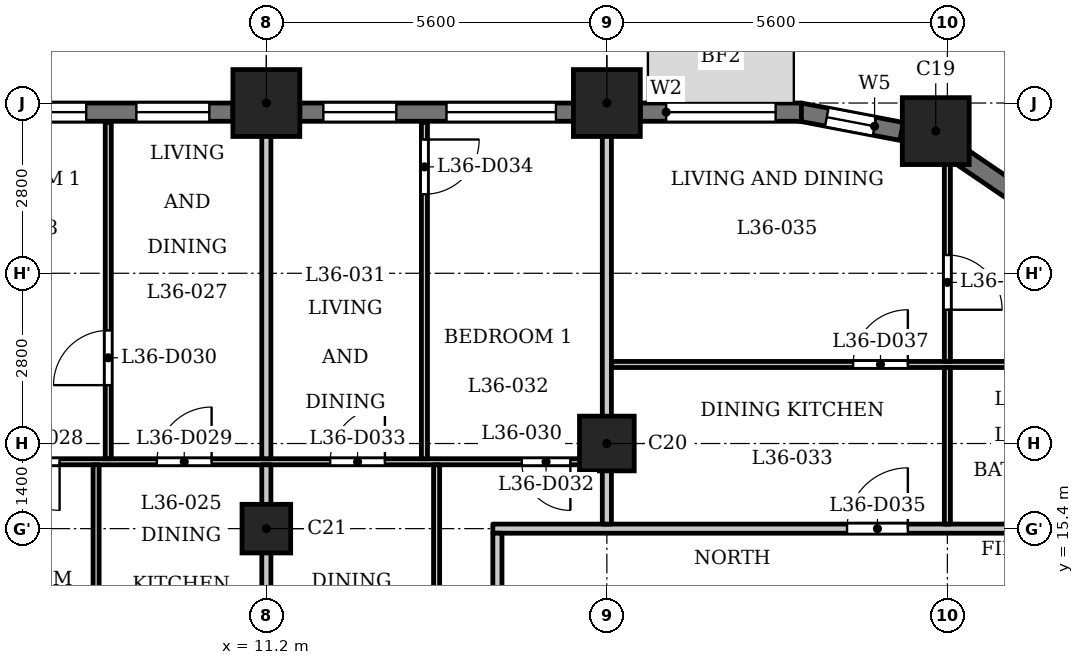
"""IFC4 building model, lengths in metres.
Left out: names, types, materials, properties, quantities, classifications, styles, units other than length and angle.
Written with IfcOpenShell. Run it as: python <this file> out.ifc"""

import sys

from ifc_helpers import new_model, si_unit, direction, frame, frame_2d, origin, origin_2d, place, context, subcontext, project, spatial, rectangle, extrude, element, fill, save


model = new_model("IFC4")
c1 = context("Model", 3, precision=1e-05, world=origin(), true_north=direction((0.0, 1.0)))
c2 = subcontext(c1, "Body", "Model", "MODEL_VIEW")
j1 = project(units=[si_unit("LENGTHUNIT", "METRE"), si_unit("PLANEANGLEUNIT", "RADIAN")], contexts=[c1])
p1 = place(None, origin())
s1 = spatial("IfcSite", under=j1, at=p1, CompositionType="ELEMENT")
p2 = place(p1, origin())
s2 = spatial("IfcBuilding", under=s1, at=p2, CompositionType="ELEMENT")
p3 = place(p2, frame((0.0, 0.0, 143.1)))
s3 = spatial("IfcBuildingStorey", under=s2, at=p3, CompositionType="ELEMENT", Elevation=143.1)
for number, where, z_axis, x_axis in (
    (1, (22.209, 21.938, 0.0), (0.0, 0.0, 1.0), (1.0, 0.0, 0.0)),
    (2, (16.8, 22.4, 0.0), (0.0, 0.0, 1.0), (1.0, 0.0, 0.0)),
    (3, (11.2, 22.4, 0.0), (0.0, 0.0, 1.0), (1.0, 0.0, 0.0)),
):
    element("IfcColumn", number, at=place(p3, frame(where, z_axis=z_axis, x_axis=x_axis)), inside=s3, PredefinedType="COLUMN", context=c2, shape_type="SweptSolid", body=[
        extrude(rectangle(XDim=1.1, YDim=1.1, at=origin_2d()), origin(), (0.0, 0.0, 1.0), 3.5),
    ])
p4 = place(p3, frame((16.8, 16.8, 0.0), z_axis=(0.0, 0.0, 1.0), x_axis=(1.0, 0.0, 0.0)))
e4 = element("IfcColumn", 4, at=p4, inside=s3, PredefinedType="COLUMN", context=c2, shape_type="SweptSolid", body=[
    extrude(rectangle(XDim=0.9, YDim=0.9, at=origin_2d()), origin(), (0.0, 0.0, 1.0), 3.5),
])
p5 = place(p3, frame((11.2, 15.4, 0.0), z_axis=(0.0, 0.0, 1.0), x_axis=(1.0, 0.0, 0.0)))
e5 = element("IfcColumn", 5, at=p5, inside=s3, PredefinedType="COLUMN", context=c2, shape_type="SweptSolid", body=[
    extrude(rectangle(XDim=0.8, YDim=0.8, at=origin_2d()), origin(), (0.0, 0.0, 1.0), 3.5),
])
p6 = place(p3, frame((23.492, 20.932, 0.0), z_axis=(0.0, 0.0, 1.0), x_axis=(-0.826993959827, 0.562210806023, 0.0)))
e6 = element("IfcWall", 6, at=p6, inside=s3, PredefinedType="SOLIDWALL", context=c2, shape_type="SweptSolid", body=[
    extrude(rectangle(XDim=1.077, YDim=0.3, at=frame_2d((0.539, 0.0))), origin(), (0.0, 0.0, 1.0), 3.2),
])
p7 = place(p3, frame((21.648, 21.933, 0.0), z_axis=(0.0, 0.0, 1.0), x_axis=(-0.982297206936, 0.187329114784, 0.0)))
e7 = element("IfcWall", 7, at=p7, inside=s3, PredefinedType="SOLIDWALL", context=c2, shape_type="SweptSolid", body=[
    extrude(rectangle(XDim=1.706, YDim=0.3, at=frame_2d((0.853, 0.0))), origin(), (0.0, 0.0, 1.0), 2.45),
])
p8 = place(p7, frame((0.453, 0.0, 0.6)))
e8 = element("IfcOpeningElement", 8, at=p8, cuts=e7, PredefinedType="OPENING", context=c2, shape_type="SweptSolid", body=[
    extrude(rectangle(XDim=0.8, YDim=1.55, at=frame_2d((0.4, 0.775))), frame((0.0, 0.16, 0.0), z_axis=(0.0, -1.0, 0.0), x_axis=(1.0, 0.0, 0.0)), (0.0, 0.0, 1.0), 0.32),
])
p9 = place(p3, frame((20.0, 22.25, 0.0), z_axis=(0.0, 0.0, 1.0), x_axis=(-1.0, 0.0, 0.0)))
e9 = element("IfcWall", 9, at=p9, inside=s3, PredefinedType="SOLIDWALL", context=c2, shape_type="SweptSolid", body=[
    extrude(rectangle(XDim=2.65, YDim=0.3, at=frame_2d((1.325, 0.0))), origin(), (0.0, 0.0, 1.0), 2.45),
])
p10 = place(p9, frame((0.425, 0.0, 0.9)))
e10 = element("IfcOpeningElement", 10, at=p10, cuts=e9, PredefinedType="OPENING", context=c2, shape_type="SweptSolid", body=[
    extrude(rectangle(XDim=1.8, YDim=1.25, at=frame_2d((0.9, 0.625))), frame((0.0, 0.16, 0.0), z_axis=(0.0, -1.0, 0.0), x_axis=(1.0, 0.0, 0.0)), (0.0, 0.0, 1.0), 0.32),
])
p11 = place(p3, frame((16.25, 22.25, 0.0), z_axis=(0.0, 0.0, 1.0), x_axis=(-1.0, 0.0, 0.0)))
e11 = element("IfcWall", 11, at=p11, inside=s3, PredefinedType="SOLIDWALL", context=c2, shape_type="SweptSolid", body=[
    extrude(rectangle(XDim=4.5, YDim=0.3, at=frame_2d((2.25, 0.0))), origin(), (0.0, 0.0, 1.0), 2.45),
])
p12 = place(p11, frame((0.288, 0.0, 0.9)))
e12 = element("IfcOpeningElement", 12, at=p12, cuts=e11, PredefinedType="OPENING", context=c2, shape_type="SweptSolid", body=[
    extrude(rectangle(XDim=1.8, YDim=1.25, at=frame_2d((0.9, 0.625))), frame((0.0, 0.16, 0.0), z_axis=(0.0, -1.0, 0.0), x_axis=(1.0, 0.0, 0.0)), (0.0, 0.0, 1.0), 0.32),
])
p13 = place(p11, frame((2.913, 0.0, 0.6)))
e13 = element("IfcOpeningElement", 13, at=p13, cuts=e11, PredefinedType="OPENING", context=c2, shape_type="SweptSolid", body=[
    extrude(rectangle(XDim=1.2, YDim=1.55, at=frame_2d((0.6, 0.775))), frame((0.0, 0.16, 0.0), z_axis=(0.0, -1.0, 0.0), x_axis=(1.0, 0.0, 0.0)), (0.0, 0.0, 1.0), 0.32),
])
p14 = place(p3, frame((10.65, 22.25, 0.0), z_axis=(0.0, 0.0, 1.0), x_axis=(-1.0, 0.0, 0.0)))
e14 = element("IfcWall", 14, at=p14, inside=s3, PredefinedType="SOLIDWALL", context=c2, shape_type="SweptSolid", body=[
    extrude(rectangle(XDim=4.5, YDim=0.3, at=frame_2d((2.25, 0.0))), origin(), (0.0, 0.0, 1.0), 2.45),
])
p15 = place(p14, frame((0.387, 0.0, 0.6)))
e15 = element("IfcOpeningElement", 15, at=p15, cuts=e14, PredefinedType="OPENING", context=c2, shape_type="SweptSolid", body=[
    extrude(rectangle(XDim=1.2, YDim=1.55, at=frame_2d((0.6, 0.775))), frame((0.0, 0.16, 0.0), z_axis=(0.0, -1.0, 0.0), x_axis=(1.0, 0.0, 0.0)), (0.0, 0.0, 1.0), 0.32),
])
p16 = place(p14, frame((2.413, 0.0, 0.9)))
e16 = element("IfcOpeningElement", 16, at=p16, cuts=e14, PredefinedType="OPENING", context=c2, shape_type="SweptSolid", body=[
    extrude(rectangle(XDim=1.8, YDim=1.25, at=frame_2d((0.9, 0.625))), frame((0.0, 0.16, 0.0), z_axis=(0.0, -1.0, 0.0), x_axis=(1.0, 0.0, 0.0)), (0.0, 0.0, 1.0), 0.32),
])
p17 = place(p3, frame((14.925, 15.4, 0.0), z_axis=(0.0, 0.0, 1.0), x_axis=(1.0, 0.0, 0.0)))
e17 = element("IfcWall", 17, at=p17, inside=s3, PredefinedType="PARTITIONING", context=c2, shape_type="SweptSolid", body=[
    extrude(rectangle(XDim=12.559, YDim=0.15, at=frame_2d((6.279, 0.0))), origin(), (0.0, 0.0, 1.0), 3.2),
])
p18 = place(p17, frame((5.825, 0.0, 0.0)))
e18 = element("IfcOpeningElement", 18, at=p18, cuts=e17, PredefinedType="OPENING", context=c2, shape_type="SweptSolid", body=[
    extrude(rectangle(XDim=1.0, YDim=2.1, at=frame_2d((0.5, 1.05))), frame((0.0, 0.085, 0.0), z_axis=(0.0, -1.0, 0.0), x_axis=(1.0, 0.0, 0.0)), (0.0, 0.0, 1.0), 0.17),
])
p19 = place(p3, frame((-16.725, 16.5, 0.0), z_axis=(0.0, 0.0, 1.0), x_axis=(1.0, 0.0, 0.0)))
e19 = element("IfcWall", 19, at=p19, inside=s3, PredefinedType="PARTITIONING", context=c2, shape_type="SweptSolid", body=[
    extrude(rectangle(XDim=33.45, YDim=0.1, at=frame_2d((16.725, 0.0))), origin(), (0.0, 0.0, 1.0), 3.2),
])
p20 = place(p19, frame((9.675, 0.0, 0.0)))
e20 = element("IfcOpeningElement", 20, at=p20, cuts=e19, PredefinedType="OPENING", context=c2, shape_type="SweptSolid", body=[
    extrude(rectangle(XDim=0.8, YDim=2.1, at=frame_2d((0.4, 1.05))), frame((0.0, 0.06, 0.0), z_axis=(0.0, -1.0, 0.0), x_axis=(1.0, 0.0, 0.0)), (0.0, 0.0, 1.0), 0.12),
])
p21 = place(p19, frame((3.975, 0.0, 0.0)))
e21 = element("IfcOpeningElement", 21, at=p21, cuts=e19, PredefinedType="OPENING", context=c2, shape_type="SweptSolid", body=[
    extrude(rectangle(XDim=0.9, YDim=2.1, at=frame_2d((0.45, 1.05))), frame((0.0, 0.06, 0.0), z_axis=(0.0, -1.0, 0.0), x_axis=(1.0, 0.0, 0.0)), (0.0, 0.0, 1.0), 0.12),
])
p22 = place(p19, frame((12.025, 0.0, 0.0)))
e22 = element("IfcOpeningElement", 22, at=p22, cuts=e19, PredefinedType="OPENING", context=c2, shape_type="SweptSolid", body=[
    extrude(rectangle(XDim=0.8, YDim=2.1, at=frame_2d((0.4, 1.05))), frame((0.0, 0.06, 0.0), z_axis=(0.0, -1.0, 0.0), x_axis=(1.0, 0.0, 0.0)), (0.0, 0.0, 1.0), 0.12),
])
p23 = place(p19, frame((15.175, 0.0, 0.0)))
e23 = element("IfcOpeningElement", 23, at=p23, cuts=e19, PredefinedType="OPENING", context=c2, shape_type="SweptSolid", body=[
    extrude(rectangle(XDim=0.9, YDim=2.1, at=frame_2d((0.45, 1.05))), frame((0.0, 0.06, 0.0), z_axis=(0.0, -1.0, 0.0), x_axis=(1.0, 0.0, 0.0)), (0.0, 0.0, 1.0), 0.12),
])
p24 = place(p19, frame((20.975, 0.0, 0.0)))
e24 = element("IfcOpeningElement", 24, at=p24, cuts=e19, PredefinedType="OPENING", context=c2, shape_type="SweptSolid", body=[
    extrude(rectangle(XDim=0.8, YDim=2.1, at=frame_2d((0.4, 1.05))), frame((0.0, 0.06, 0.0), z_axis=(0.0, -1.0, 0.0), x_axis=(1.0, 0.0, 0.0)), (0.0, 0.0, 1.0), 0.12),
])
p25 = place(p19, frame((18.175, 0.0, 0.0)))
e25 = element("IfcOpeningElement", 25, at=p25, cuts=e19, PredefinedType="OPENING", context=c2, shape_type="SweptSolid", body=[
    extrude(rectangle(XDim=0.9, YDim=2.1, at=frame_2d((0.45, 1.05))), frame((0.0, 0.06, 0.0), z_axis=(0.0, -1.0, 0.0), x_axis=(1.0, 0.0, 0.0)), (0.0, 0.0, 1.0), 0.12),
])
p26 = place(p19, frame((23.725, 0.0, 0.0)))
e26 = element("IfcOpeningElement", 26, at=p26, cuts=e19, PredefinedType="OPENING", context=c2, shape_type="SweptSolid", body=[
    extrude(rectangle(XDim=0.8, YDim=2.1, at=frame_2d((0.4, 1.05))), frame((0.0, 0.06, 0.0), z_axis=(0.0, -1.0, 0.0), x_axis=(1.0, 0.0, 0.0)), (0.0, 0.0, 1.0), 0.12),
])
p27 = place(p19, frame((26.125, 0.0, 0.0)))
e27 = element("IfcOpeningElement", 27, at=p27, cuts=e19, PredefinedType="OPENING", context=c2, shape_type="SweptSolid", body=[
    extrude(rectangle(XDim=0.9, YDim=2.1, at=frame_2d((0.45, 1.05))), frame((0.0, 0.06, 0.0), z_axis=(0.0, -1.0, 0.0), x_axis=(1.0, 0.0, 0.0)), (0.0, 0.0, 1.0), 0.12),
])
p28 = place(p19, frame((32.125, 0.0, 0.0)))
e28 = element("IfcOpeningElement", 28, at=p28, cuts=e19, PredefinedType="OPENING", context=c2, shape_type="SweptSolid", body=[
    extrude(rectangle(XDim=0.8, YDim=2.1, at=frame_2d((0.4, 1.05))), frame((0.0, 0.06, 0.0), z_axis=(0.0, -1.0, 0.0), x_axis=(1.0, 0.0, 0.0)), (0.0, 0.0, 1.0), 0.12),
])
p29 = place(p19, frame((28.975, 0.0, 0.0)))
e29 = element("IfcOpeningElement", 29, at=p29, cuts=e19, PredefinedType="OPENING", context=c2, shape_type="SweptSolid", body=[
    extrude(rectangle(XDim=0.9, YDim=2.1, at=frame_2d((0.45, 1.05))), frame((0.0, 0.06, 0.0), z_axis=(0.0, -1.0, 0.0), x_axis=(1.0, 0.0, 0.0)), (0.0, 0.0, 1.0), 0.12),
])
p30 = place(p3, frame((16.875, 18.1, 0.0), z_axis=(0.0, 0.0, 1.0), x_axis=(1.0, 0.0, 0.0)))
e30 = element("IfcWall", 30, at=p30, inside=s3, PredefinedType="PARTITIONING", context=c2, shape_type="SweptSolid", body=[
    extrude(rectangle(XDim=9.315, YDim=0.1, at=frame_2d((4.658, 0.0))), origin(), (0.0, 0.0, 1.0), 3.2),
])
p31 = place(p30, frame((7.425, 0.0, 0.0)))
e31 = element("IfcOpeningElement", 31, at=p31, cuts=e30, PredefinedType="OPENING", context=c2, shape_type="SweptSolid", body=[
    extrude(rectangle(XDim=0.8, YDim=2.1, at=frame_2d((0.4, 1.05))), frame((0.0, 0.06, 0.0), z_axis=(0.0, -1.0, 0.0), x_axis=(1.0, 0.0, 0.0)), (0.0, 0.0, 1.0), 0.12),
])
p32 = place(p30, frame((3.975, 0.0, 0.0)))
e32 = element("IfcOpeningElement", 32, at=p32, cuts=e30, PredefinedType="OPENING", context=c2, shape_type="SweptSolid", body=[
    extrude(rectangle(XDim=0.9, YDim=2.1, at=frame_2d((0.45, 1.05))), frame((0.0, 0.06, 0.0), z_axis=(0.0, -1.0, 0.0), x_axis=(1.0, 0.0, 0.0)), (0.0, 0.0, 1.0), 0.12),
])
p33 = place(p3, frame((8.4, 13.275, 0.0), z_axis=(0.0, 0.0, 1.0), x_axis=(0.0, 1.0, 0.0)))
e33 = element("IfcWall", 33, at=p33, inside=s3, PredefinedType="PARTITIONING", context=c2, shape_type="SweptSolid", body=[
    extrude(rectangle(XDim=3.175, YDim=0.1, at=frame_2d((1.587, 0.0))), origin(), (0.0, 0.0, 1.0), 3.2),
])
p34 = place(p3, frame((8.6, 16.55, 0.0), z_axis=(0.0, 0.0, 1.0), x_axis=(0.0, 1.0, 0.0)))
e34 = element("IfcWall", 34, at=p34, inside=s3, PredefinedType="PARTITIONING", context=c2, shape_type="SweptSolid", body=[
    extrude(rectangle(XDim=5.53, YDim=0.1, at=frame_2d((2.765, 0.0))), origin(), (0.0, 0.0, 1.0), 3.2),
])
p35 = place(p34, frame((1.21, 0.0, 0.0)))
e35 = element("IfcOpeningElement", 35, at=p35, cuts=e34, PredefinedType="OPENING", context=c2, shape_type="SweptSolid", body=[
    extrude(rectangle(XDim=0.9, YDim=2.1, at=frame_2d((0.45, 1.05))), frame((0.0, 0.06, 0.0), z_axis=(0.0, -1.0, 0.0), x_axis=(1.0, 0.0, 0.0)), (0.0, 0.0, 1.0), 0.12),
])
p36 = place(p3, frame((11.2, 13.275, 0.0), z_axis=(0.0, 0.0, 1.0), x_axis=(0.0, 1.0, 0.0)))
e36 = element("IfcWall", 36, at=p36, inside=s3, PredefinedType="PARTITIONING", context=c2, shape_type="SweptSolid", body=[
    extrude(rectangle(XDim=3.175, YDim=0.15, at=frame_2d((1.587, 0.0))), origin(), (0.0, 0.0, 1.0), 3.2),
])
p37 = place(p3, frame((11.2, 16.55, 0.0), z_axis=(0.0, 0.0, 1.0), x_axis=(0.0, 1.0, 0.0)))
e37 = element("IfcWall", 37, at=p37, inside=s3, PredefinedType="PARTITIONING", context=c2, shape_type="SweptSolid", body=[
    extrude(rectangle(XDim=6.38, YDim=0.15, at=frame_2d((3.19, 0.0))), origin(), (0.0, 0.0, 1.0), 3.2),
])
p38 = place(p3, frame((13.8, 16.55, 0.0), z_axis=(0.0, 0.0, 1.0), x_axis=(0.0, 1.0, 0.0)))
e38 = element("IfcWall", 38, at=p38, inside=s3, PredefinedType="PARTITIONING", context=c2, shape_type="SweptSolid", body=[
    extrude(rectangle(XDim=5.53, YDim=0.1, at=frame_2d((2.765, 0.0))), origin(), (0.0, 0.0, 1.0), 3.2),
])
p39 = place(p38, frame((4.35, 0.0, 0.0)))
e39 = element("IfcOpeningElement", 39, at=p39, cuts=e38, PredefinedType="OPENING", context=c2, shape_type="SweptSolid", body=[
    extrude(rectangle(XDim=0.9, YDim=2.1, at=frame_2d((0.45, 1.05))), frame((0.0, 0.06, 0.0), z_axis=(0.0, -1.0, 0.0), x_axis=(1.0, 0.0, 0.0)), (0.0, 0.0, 1.0), 0.12),
])
p40 = place(p3, frame((14.0, 13.275, 0.0), z_axis=(0.0, 0.0, 1.0), x_axis=(0.0, 1.0, 0.0)))
e40 = element("IfcWall", 40, at=p40, inside=s3, PredefinedType="PARTITIONING", context=c2, shape_type="SweptSolid", body=[
    extrude(rectangle(XDim=3.175, YDim=0.1, at=frame_2d((1.587, 0.0))), origin(), (0.0, 0.0, 1.0), 3.2),
])
p41 = place(p3, frame((15.0, 13.275, 0.0), z_axis=(0.0, 0.0, 1.0), x_axis=(0.0, 1.0, 0.0)))
e41 = element("IfcWall", 41, at=p41, inside=s3, PredefinedType="PARTITIONING", context=c2, shape_type="SweptSolid", body=[
    extrude(rectangle(XDim=2.05, YDim=0.15, at=frame_2d((1.025, 0.0))), origin(), (0.0, 0.0, 1.0), 3.2),
])
p42 = place(p3, frame((16.8, 15.475, 0.0), z_axis=(0.0, 0.0, 1.0), x_axis=(0.0, 1.0, 0.0)))
e42 = element("IfcWall", 42, at=p42, inside=s3, PredefinedType="PARTITIONING", context=c2, shape_type="SweptSolid", body=[
    extrude(rectangle(XDim=7.455, YDim=0.15, at=frame_2d((3.728, 0.0))), origin(), (0.0, 0.0, 1.0), 3.2),
])
p43 = place(p3, frame((22.4, 15.475, 0.0), z_axis=(0.0, 0.0, 1.0), x_axis=(0.0, 1.0, 0.0)))
e43 = element("IfcWall", 43, at=p43, inside=s3, PredefinedType="PARTITIONING", context=c2, shape_type="SweptSolid", body=[
    extrude(rectangle(XDim=2.575, YDim=0.1, at=frame_2d((1.288, 0.0))), origin(), (0.0, 0.0, 1.0), 3.2),
])
p44 = place(p3, frame((22.4, 18.15, 0.0), z_axis=(0.0, 0.0, 1.0), x_axis=(0.0, 1.0, 0.0)))
e44 = element("IfcWall", 44, at=p44, inside=s3, PredefinedType="PARTITIONING", context=c2, shape_type="SweptSolid", body=[
    extrude(rectangle(XDim=3.57, YDim=0.1, at=frame_2d((1.785, 0.0))), origin(), (0.0, 0.0, 1.0), 3.2),
])
p45 = place(p44, frame((0.85, 0.0, 0.0)))
e45 = element("IfcOpeningElement", 45, at=p45, cuts=e44, PredefinedType="OPENING", context=c2, shape_type="SweptSolid", body=[
    extrude(rectangle(XDim=0.9, YDim=2.1, at=frame_2d((0.45, 1.05))), frame((0.0, 0.06, 0.0), z_axis=(0.0, -1.0, 0.0), x_axis=(1.0, 0.0, 0.0)), (0.0, 0.0, 1.0), 0.12),
])
p46 = place(p26, origin())
e46 = element("IfcDoor", 46, at=p46, inside=s3, OperationType="SINGLE_SWING_RIGHT", PredefinedType="DOOR", context=c2, shape_type="SweptSolid", body=[
    extrude(rectangle(XDim=0.8, YDim=2.1, at=frame_2d((0.4, 1.05))), frame((0.0, 0.025, 0.0), z_axis=(0.0, -1.0, 0.0), x_axis=(1.0, 0.0, 0.0)), (0.0, 0.0, 1.0), 0.05),
])
fill(e26, e46)
p47 = place(p27, origin())
e47 = element("IfcDoor", 47, at=p47, inside=s3, OperationType="SINGLE_SWING_LEFT", PredefinedType="DOOR", context=c2, shape_type="SweptSolid", body=[
    extrude(rectangle(XDim=0.9, YDim=2.1, at=frame_2d((0.45, 1.05))), frame((0.0, 0.025, 0.0), z_axis=(0.0, -1.0, 0.0), x_axis=(1.0, 0.0, 0.0)), (0.0, 0.0, 1.0), 0.05),
])
fill(e27, e47)
p48 = place(p35, origin())
e48 = element("IfcDoor", 48, at=p48, inside=s3, OperationType="SINGLE_SWING_RIGHT", PredefinedType="DOOR", context=c2, shape_type="SweptSolid", body=[
    extrude(rectangle(XDim=0.9, YDim=2.1, at=frame_2d((0.45, 1.05))), frame((0.0, 0.025, 0.0), z_axis=(0.0, -1.0, 0.0), x_axis=(1.0, 0.0, 0.0)), (0.0, 0.0, 1.0), 0.05),
])
fill(e35, e48)
p49 = place(p28, origin())
e49 = element("IfcDoor", 49, at=p49, inside=s3, OperationType="SINGLE_SWING_RIGHT", PredefinedType="DOOR", context=c2, shape_type="SweptSolid", body=[
    extrude(rectangle(XDim=0.8, YDim=2.1, at=frame_2d((0.4, 1.05))), frame((0.0, 0.025, 0.0), z_axis=(0.0, -1.0, 0.0), x_axis=(1.0, 0.0, 0.0)), (0.0, 0.0, 1.0), 0.05),
])
fill(e28, e49)
p50 = place(p29, origin())
e50 = element("IfcDoor", 50, at=p50, inside=s3, OperationType="SINGLE_SWING_LEFT", PredefinedType="DOOR", context=c2, shape_type="SweptSolid", body=[
    extrude(rectangle(XDim=0.9, YDim=2.1, at=frame_2d((0.45, 1.05))), frame((0.0, 0.025, 0.0), z_axis=(0.0, -1.0, 0.0), x_axis=(1.0, 0.0, 0.0)), (0.0, 0.0, 1.0), 0.05),
])
fill(e29, e50)
p51 = place(p39, origin())
e51 = element("IfcDoor", 51, at=p51, inside=s3, OperationType="SINGLE_SWING_RIGHT", PredefinedType="DOOR", context=c2, shape_type="SweptSolid", body=[
    extrude(rectangle(XDim=0.9, YDim=2.1, at=frame_2d((0.45, 1.05))), frame((0.0, 0.025, 0.0), z_axis=(0.0, -1.0, 0.0), x_axis=(1.0, 0.0, 0.0)), (0.0, 0.0, 1.0), 0.05),
])
fill(e39, e51)
p52 = place(p18, origin())
e52 = element("IfcDoor", 52, at=p52, inside=s3, OperationType="SINGLE_SWING_LEFT", PredefinedType="DOOR", context=c2, shape_type="SweptSolid", body=[
    extrude(rectangle(XDim=1.0, YDim=2.1, at=frame_2d((0.5, 1.05))), frame((0.0, 0.025, 0.0), z_axis=(0.0, -1.0, 0.0), x_axis=(1.0, 0.0, 0.0)), (0.0, 0.0, 1.0), 0.05),
])
fill(e18, e52)
p53 = place(p32, origin())
e53 = element("IfcDoor", 53, at=p53, inside=s3, OperationType="SINGLE_SWING_LEFT", PredefinedType="DOOR", context=c2, shape_type="SweptSolid", body=[
    extrude(rectangle(XDim=0.9, YDim=2.1, at=frame_2d((0.45, 1.05))), frame((0.0, 0.025, 0.0), z_axis=(0.0, -1.0, 0.0), x_axis=(1.0, 0.0, 0.0)), (0.0, 0.0, 1.0), 0.05),
])
fill(e32, e53)
p54 = place(p45, origin())
e54 = element("IfcDoor", 54, at=p54, inside=s3, OperationType="SINGLE_SWING_LEFT", PredefinedType="DOOR", context=c2, shape_type="SweptSolid", body=[
    extrude(rectangle(XDim=0.9, YDim=2.1, at=frame_2d((0.45, 1.05))), frame((0.0, 0.025, 0.0), z_axis=(0.0, -1.0, 0.0), x_axis=(1.0, 0.0, 0.0)), (0.0, 0.0, 1.0), 0.05),
])
fill(e45, e54)
p55 = place(p8, origin())
e55 = element("IfcWindow", 55, at=p55, inside=s3, PartitioningType="SINGLE_PANEL", PredefinedType="WINDOW", context=c2, shape_type="SweptSolid", body=[
    extrude(rectangle(XDim=0.8, YDim=1.55, at=frame_2d((0.4, 0.775))), frame((0.0, 0.03, 0.0), z_axis=(0.0, -1.0, 0.0), x_axis=(1.0, 0.0, 0.0)), (0.0, 0.0, 1.0), 0.06),
])
fill(e8, e55)
p56 = place(p10, origin())
e56 = element("IfcWindow", 56, at=p56, inside=s3, PartitioningType="SINGLE_PANEL", PredefinedType="WINDOW", context=c2, shape_type="SweptSolid", body=[
    extrude(rectangle(XDim=1.8, YDim=1.25, at=frame_2d((0.9, 0.625))), frame((0.0, 0.03, 0.0), z_axis=(0.0, -1.0, 0.0), x_axis=(1.0, 0.0, 0.0)), (0.0, 0.0, 1.0), 0.06),
])
fill(e10, e56)
p57 = place(p12, origin())
e57 = element("IfcWindow", 57, at=p57, inside=s3, PartitioningType="SINGLE_PANEL", PredefinedType="WINDOW", context=c2, shape_type="SweptSolid", body=[
    extrude(rectangle(XDim=1.8, YDim=1.25, at=frame_2d((0.9, 0.625))), frame((0.0, 0.03, 0.0), z_axis=(0.0, -1.0, 0.0), x_axis=(1.0, 0.0, 0.0)), (0.0, 0.0, 1.0), 0.06),
])
fill(e12, e57)
p58 = place(p13, origin())
e58 = element("IfcWindow", 58, at=p58, inside=s3, PartitioningType="SINGLE_PANEL", PredefinedType="WINDOW", context=c2, shape_type="SweptSolid", body=[
    extrude(rectangle(XDim=1.2, YDim=1.55, at=frame_2d((0.6, 0.775))), frame((0.0, 0.03, 0.0), z_axis=(0.0, -1.0, 0.0), x_axis=(1.0, 0.0, 0.0)), (0.0, 0.0, 1.0), 0.06),
])
fill(e13, e58)
p59 = place(p15, origin())
e59 = element("IfcWindow", 59, at=p59, inside=s3, PartitioningType="SINGLE_PANEL", PredefinedType="WINDOW", context=c2, shape_type="SweptSolid", body=[
    extrude(rectangle(XDim=1.2, YDim=1.55, at=frame_2d((0.6, 0.775))), frame((0.0, 0.03, 0.0), z_axis=(0.0, -1.0, 0.0), x_axis=(1.0, 0.0, 0.0)), (0.0, 0.0, 1.0), 0.06),
])
fill(e15, e59)
p60 = place(p16, origin())
e60 = element("IfcWindow", 60, at=p60, inside=s3, PartitioningType="SINGLE_PANEL", PredefinedType="WINDOW", context=c2, shape_type="SweptSolid", body=[
    extrude(rectangle(XDim=1.8, YDim=1.25, at=frame_2d((0.9, 0.625))), frame((0.0, 0.03, 0.0), z_axis=(0.0, -1.0, 0.0), x_axis=(1.0, 0.0, 0.0)), (0.0, 0.0, 1.0), 0.06),
])
fill(e16, e60)
save(model, sys.argv[1])
